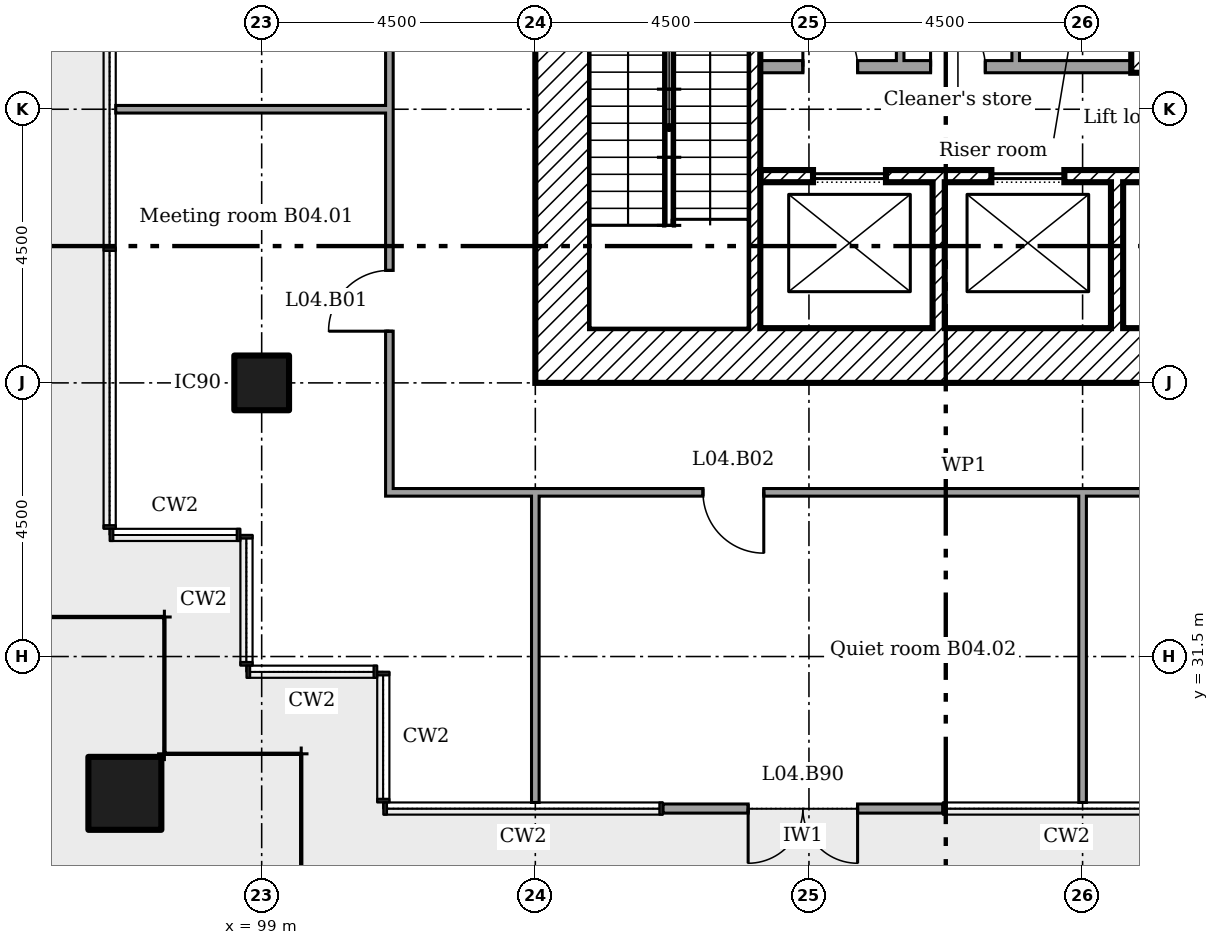
"""IFC4 building model, lengths in metres.
Left out: names, types, materials, properties, quantities, classifications, styles, units other than length and angle.
Written with IfcOpenShell. Run it as: python <this file> out.ifc"""

import sys

from ifc_helpers import new_model, si_unit, direction, frame, frame_2d, origin, origin_2d, place, context, subcontext, project, spatial, rectangle, extrude, element, fill, save


model = new_model("IFC4")
c1 = context("Model", 3, precision=1e-05, world=origin(), true_north=direction((0.0, 1.0)))
c2 = subcontext(c1, "Body", "Model", "MODEL_VIEW")
j1 = project(units=[si_unit("LENGTHUNIT", "METRE"), si_unit("PLANEANGLEUNIT", "RADIAN")], contexts=[c1])
p1 = place(None, origin())
s1 = spatial("IfcSite", under=j1, at=p1, CompositionType="ELEMENT")
p2 = place(p1, origin())
s2 = spatial("IfcBuilding", under=s1, at=p2, CompositionType="ELEMENT")
p3 = place(p2, frame((0.0, 0.0, 21.0)))
s3 = spatial("IfcBuildingStorey", under=s2, at=p3, CompositionType="ELEMENT", Elevation=21.0)
p4 = place(p3, frame((96.75, 29.25, 0.0)))
e1 = element("IfcColumn", 1, at=p4, inside=s3, PredefinedType="COLUMN", context=c2, shape_type="SweptSolid", body=[
    extrude(rectangle(XDim=1.2, YDim=1.2, at=origin_2d()), origin(), (0.0, 0.0, 1.0), 4.4),
])
p5 = place(p3, frame((99.0, 36.0, 0.0)))
e2 = element("IfcColumn", 2, at=p5, inside=s3, PredefinedType="COLUMN", context=c2, shape_type="SweptSolid", body=[
    extrude(rectangle(XDim=0.9, YDim=0.9, at=origin_2d()), origin(), (0.0, 0.0, 1.0), 4.4),
])
p6 = place(p3, frame((105.6, 29.0, 0.0)))
e3 = element("IfcWall", 3, at=p6, inside=s3, PredefinedType="SOLIDWALL", context=c2, shape_type="SweptSolid", body=[
    extrude(rectangle(XDim=4.6, YDim=0.15, at=frame_2d((2.3, 0.0))), origin(), (0.0, 0.0, 1.0), 4.225),
])
p7 = place(p6, frame((1.4, 0.0, 0.0)))
e4 = element("IfcOpeningElement", 4, at=p7, cuts=e3, PredefinedType="OPENING", context=c2, shape_type="SweptSolid", body=[
    extrude(rectangle(XDim=1.8, YDim=2.4, at=frame_2d((0.9, 1.2))), frame((0.0, 0.085, 0.0), z_axis=(0.0, -1.0, 0.0), x_axis=(1.0, 0.0, 0.0)), (0.0, 0.0, 1.0), 0.17),
])
p8 = place(p3, frame((104.4, 36.45, 0.0)))
e5 = element("IfcWall", 5, at=p8, inside=s3, PredefinedType="SHEAR", context=c2, shape_type="SweptSolid", body=[
    extrude(rectangle(XDim=11.7, YDim=0.9, at=frame_2d((5.85, 0.0))), origin(), (0.0, 0.0, 1.0), 4.125),
])
p9 = place(p3, frame((103.95, 36.0, 0.0), z_axis=(0.0, 0.0, 1.0), x_axis=(0.0, 1.0, 0.0)))
e6 = element("IfcWall", 6, at=p9, inside=s3, PredefinedType="SHEAR", context=c2, shape_type="SweptSolid", body=[
    extrude(rectangle(XDim=13.5, YDim=0.9, at=frame_2d((6.75, 0.0))), origin(), (0.0, 0.0, 1.0), 4.125),
])
p10 = place(p9, frame((8.2, 0.0, 0.0)))
e7 = element("IfcOpeningElement", 7, at=p10, cuts=e6, PredefinedType="OPENING", context=c2, shape_type="SweptSolid", body=[
    extrude(rectangle(XDim=1.2, YDim=2.1, at=frame_2d((0.6, 1.05))), frame((0.0, 0.46, 0.0), z_axis=(0.0, -1.0, 0.0), x_axis=(1.0, 0.0, 0.0)), (0.0, 0.0, 1.0), 0.92),
])
p11 = place(p9, frame((6.225, 0.0, 0.0)))
e8 = element("IfcOpeningElement", 8, at=p11, cuts=e6, PredefinedType="OPENING", context=c2, shape_type="SweptSolid", body=[
    extrude(rectangle(XDim=1.0, YDim=2.1, at=frame_2d((0.5, 1.05))), frame((0.0, 0.46, 0.0), z_axis=(0.0, -1.0, 0.0), x_axis=(1.0, 0.0, 0.0)), (0.0, 0.0, 1.0), 0.92),
])
for number, where, z_axis, x_axis in (
    (9, (110.133, 36.9, 0.0), (0.0, 0.0, 1.0), (0.0, 1.0, 0.0)),
    (10, (113.067, 36.9, 0.0), (0.0, 0.0, 1.0), (0.0, 1.0, 0.0)),
):
    element("IfcWall", number, at=place(p3, frame(where, z_axis=z_axis, x_axis=x_axis)), inside=s3, PredefinedType="SHEAR", context=c2, shape_type="SweptSolid", body=[
        extrude(rectangle(XDim=2.4, YDim=0.2, at=frame_2d((1.2, 0.0))), origin(), (0.0, 0.0, 1.0), 4.125),
    ])
p12 = place(p3, frame((107.2, 39.4, 0.0)))
e11 = element("IfcWall", 11, at=p12, inside=s3, PredefinedType="SHEAR", context=c2, shape_type="SweptSolid", body=[
    extrude(rectangle(XDim=8.9, YDim=0.2, at=frame_2d((4.45, 0.0))), origin(), (0.0, 0.0, 1.0), 4.125),
])
p13 = place(p12, frame((0.867, 0.0, 0.0)))
e12 = element("IfcOpeningElement", 12, at=p13, cuts=e11, PredefinedType="OPENING", context=c2, shape_type="SweptSolid", body=[
    extrude(rectangle(XDim=1.2, YDim=2.1, at=frame_2d((0.6, 1.05))), frame((0.0, 0.11, 0.0), z_axis=(0.0, -1.0, 0.0), x_axis=(1.0, 0.0, 0.0)), (0.0, 0.0, 1.0), 0.22),
])
p14 = place(p12, frame((3.8, 0.0, 0.0)))
e13 = element("IfcOpeningElement", 13, at=p14, cuts=e11, PredefinedType="OPENING", context=c2, shape_type="SweptSolid", body=[
    extrude(rectangle(XDim=1.2, YDim=2.1, at=frame_2d((0.6, 1.05))), frame((0.0, 0.11, 0.0), z_axis=(0.0, -1.0, 0.0), x_axis=(1.0, 0.0, 0.0)), (0.0, 0.0, 1.0), 0.22),
])
p15 = place(p12, frame((6.733, 0.0, 0.0)))
e14 = element("IfcOpeningElement", 14, at=p15, cuts=e11, PredefinedType="OPENING", context=c2, shape_type="SweptSolid", body=[
    extrude(rectangle(XDim=1.2, YDim=2.1, at=frame_2d((0.6, 1.05))), frame((0.0, 0.11, 0.0), z_axis=(0.0, -1.0, 0.0), x_axis=(1.0, 0.0, 0.0)), (0.0, 0.0, 1.0), 0.22),
])
p16 = place(p3, frame((107.1, 36.9, 0.0), z_axis=(0.0, 0.0, 1.0), x_axis=(0.0, 1.0, 0.0)))
e15 = element("IfcWall", 15, at=p16, inside=s3, PredefinedType="SHEAR", context=c2, shape_type="SweptSolid", body=[
    extrude(rectangle(XDim=6.8, YDim=0.2, at=frame_2d((3.4, 0.0))), origin(), (0.0, 0.0, 1.0), 4.125),
])
p17 = place(p3, frame((113.4, 41.1, 0.0), z_axis=(0.0, 0.0, 1.0), x_axis=(0.0, 1.0, 0.0)))
e16 = element("IfcWall", 16, at=p17, inside=s3, PredefinedType="SHEAR", context=c2, shape_type="SweptSolid", body=[
    extrude(rectangle(XDim=7.5, YDim=0.2, at=frame_2d((3.75, 0.0))), origin(), (0.0, 0.0, 1.0), 4.125),
])
p18 = place(p3, frame((107.2, 41.2, 0.0)))
e17 = element("IfcWall", 17, at=p18, inside=s3, PredefinedType="PARTITIONING", context=c2, shape_type="SweptSolid", body=[
    extrude(rectangle(XDim=6.1, YDim=0.2, at=frame_2d((3.05, 0.0))), origin(), (0.0, 0.0, 1.0), 4.125),
])
p19 = place(p18, frame((0.7, 0.0, 0.0)))
e18 = element("IfcOpeningElement", 18, at=p19, cuts=e17, PredefinedType="OPENING", context=c2, shape_type="SweptSolid", body=[
    extrude(rectangle(XDim=0.9, YDim=2.1, at=frame_2d((0.45, 1.05))), frame((0.0, 0.11, 0.0), z_axis=(0.0, -1.0, 0.0), x_axis=(1.0, 0.0, 0.0)), (0.0, 0.0, 1.0), 0.22),
])
p20 = place(p18, frame((2.8, 0.0, 0.0)))
e19 = element("IfcOpeningElement", 19, at=p20, cuts=e17, PredefinedType="OPENING", context=c2, shape_type="SweptSolid", body=[
    extrude(rectangle(XDim=0.9, YDim=2.1, at=frame_2d((0.45, 1.05))), frame((0.0, 0.11, 0.0), z_axis=(0.0, -1.0, 0.0), x_axis=(1.0, 0.0, 0.0)), (0.0, 0.0, 1.0), 0.22),
])
for number, where, z_axis, x_axis in (
    (20, (109.5, 41.3, 0.0), (0.0, 0.0, 1.0), (0.0, 1.0, 0.0)),
    (21, (111.4, 41.3, 0.0), (0.0, 0.0, 1.0), (0.0, 1.0, 0.0)),
):
    element("IfcWall", number, at=place(p3, frame(where, z_axis=z_axis, x_axis=x_axis)), inside=s3, PredefinedType="PARTITIONING", context=c2, shape_type="SweptSolid", body=[
        extrude(rectangle(XDim=1.7, YDim=0.125, at=frame_2d((0.85, 0.0))), origin(), (0.0, 0.0, 1.0), 4.125),
    ])
p21 = place(p3, frame((101.038, 34.2, 0.0)))
e22 = element("IfcWall", 22, at=p21, inside=s3, PredefinedType="PARTITIONING", context=c2, shape_type="SweptSolid", body=[
    extrude(rectangle(XDim=19.025, YDim=0.125, at=frame_2d((9.512, 0.0))), origin(), (0.0, 0.0, 1.0), 4.225),
])
p22 = place(p21, frame((5.219, 0.0, 0.0)))
e23 = element("IfcOpeningElement", 23, at=p22, cuts=e22, PredefinedType="OPENING", context=c2, shape_type="SweptSolid", body=[
    extrude(rectangle(XDim=1.0, YDim=2.1, at=frame_2d((0.5, 1.05))), frame((0.0, 0.073, 0.0), z_axis=(0.0, -1.0, 0.0), x_axis=(1.0, 0.0, 0.0)), (0.0, 0.0, 1.0), 0.145),
])
p23 = place(p3, frame((96.6, 40.5, 0.0)))
e24 = element("IfcWall", 24, at=p23, inside=s3, PredefinedType="PARTITIONING", context=c2, shape_type="SweptSolid", body=[
    extrude(rectangle(XDim=4.5, YDim=0.125, at=frame_2d((2.25, 0.0))), origin(), (0.0, 0.0, 1.0), 3.613),
])
p24 = place(p3, frame((101.1, 34.262, 0.0), z_axis=(0.0, 0.0, 1.0), x_axis=(0.0, 1.0, 0.0)))
e25 = element("IfcWall", 25, at=p24, inside=s3, PredefinedType="PARTITIONING", context=c2, shape_type="SweptSolid", body=[
    extrude(rectangle(XDim=17.575, YDim=0.125, at=frame_2d((8.788, 0.0))), origin(), (0.0, 0.0, 1.0), 4.225),
])
p25 = place(p24, frame((2.587, 0.0, 0.0)))
e26 = element("IfcOpeningElement", 26, at=p25, cuts=e25, PredefinedType="OPENING", context=c2, shape_type="SweptSolid", body=[
    extrude(rectangle(XDim=1.0, YDim=2.1, at=frame_2d((0.5, 1.05))), frame((0.0, 0.073, 0.0), z_axis=(0.0, -1.0, 0.0), x_axis=(1.0, 0.0, 0.0)), (0.0, 0.0, 1.0), 0.145),
])
p26 = place(p24, frame((13.101, 0.0, 0.0)))
e27 = element("IfcOpeningElement", 27, at=p26, cuts=e25, PredefinedType="OPENING", context=c2, shape_type="SweptSolid", body=[
    extrude(rectangle(XDim=1.0, YDim=2.1, at=frame_2d((0.5, 1.05))), frame((0.0, 0.073, 0.0), z_axis=(0.0, -1.0, 0.0), x_axis=(1.0, 0.0, 0.0)), (0.0, 0.0, 1.0), 0.145),
])
for number, where, z_axis, x_axis in (
    (28, (103.5, 29.1, 0.0), (0.0, 0.0, 1.0), (0.0, 1.0, 0.0)),
    (29, (112.5, 29.1, 0.0), (0.0, 0.0, 1.0), (0.0, 1.0, 0.0)),
):
    element("IfcWall", number, at=place(p3, frame(where, z_axis=z_axis, x_axis=x_axis)), inside=s3, PredefinedType="PARTITIONING", context=c2, shape_type="SweptSolid", body=[
        extrude(rectangle(XDim=5.1, YDim=0.125, at=frame_2d((2.55, 0.0))), origin(), (0.0, 0.0, 1.0), 3.613),
    ])
p27 = place(p7, frame((1.8, 0.0, 0.0), x_axis=(-1.0, 0.0, 0.0)))
e30 = element("IfcDoor", 30, at=p27, inside=s3, OperationType="DOUBLE_DOOR_DOUBLE_SWING", PredefinedType="NOTDEFINED", context=c2, shape_type="SweptSolid", body=[
    extrude(rectangle(XDim=1.8, YDim=2.4, at=frame_2d((0.9, 1.2))), frame((0.0, 0.025, 0.0), z_axis=(0.0, -1.0, 0.0), x_axis=(1.0, 0.0, 0.0)), (0.0, 0.0, 1.0), 0.05),
])
fill(e4, e30)
p28 = place(p19, origin())
e31 = element("IfcDoor", 31, at=p28, inside=s3, OperationType="SINGLE_SWING_RIGHT", PredefinedType="DOOR", context=c2, shape_type="SweptSolid", body=[
    extrude(rectangle(XDim=0.9, YDim=2.1, at=frame_2d((0.45, 1.05))), frame((0.0, 0.025, 0.0), z_axis=(0.0, -1.0, 0.0), x_axis=(1.0, 0.0, 0.0)), (0.0, 0.0, 1.0), 0.05),
])
fill(e18, e31)
p29 = place(p20, origin())
e32 = element("IfcDoor", 32, at=p29, inside=s3, OperationType="SINGLE_SWING_RIGHT", PredefinedType="DOOR", context=c2, shape_type="SweptSolid", body=[
    extrude(rectangle(XDim=0.9, YDim=2.1, at=frame_2d((0.45, 1.05))), frame((0.0, 0.025, 0.0), z_axis=(0.0, -1.0, 0.0), x_axis=(1.0, 0.0, 0.0)), (0.0, 0.0, 1.0), 0.05),
])
fill(e19, e32)
p30 = place(p13, origin())
e33 = element("IfcDoor", 33, at=p30, inside=s3, OperationType="SLIDING_TO_LEFT", PredefinedType="DOOR", context=c2, shape_type="SweptSolid", body=[
    extrude(rectangle(XDim=1.2, YDim=2.1, at=frame_2d((0.6, 1.05))), frame((0.0, 0.025, 0.0), z_axis=(0.0, -1.0, 0.0), x_axis=(1.0, 0.0, 0.0)), (0.0, 0.0, 1.0), 0.05),
])
fill(e12, e33)
p31 = place(p14, origin())
e34 = element("IfcDoor", 34, at=p31, inside=s3, OperationType="SLIDING_TO_LEFT", PredefinedType="DOOR", context=c2, shape_type="SweptSolid", body=[
    extrude(rectangle(XDim=1.2, YDim=2.1, at=frame_2d((0.6, 1.05))), frame((0.0, 0.025, 0.0), z_axis=(0.0, -1.0, 0.0), x_axis=(1.0, 0.0, 0.0)), (0.0, 0.0, 1.0), 0.05),
])
fill(e13, e34)
p32 = place(p25, origin())
e35 = element("IfcDoor", 35, at=p32, inside=s3, OperationType="SINGLE_SWING_RIGHT", PredefinedType="DOOR", context=c2, shape_type="SweptSolid", body=[
    extrude(rectangle(XDim=1.0, YDim=2.1, at=frame_2d((0.5, 1.05))), frame((0.0, 0.025, 0.0), z_axis=(0.0, -1.0, 0.0), x_axis=(1.0, 0.0, 0.0)), (0.0, 0.0, 1.0), 0.05),
])
fill(e26, e35)
p33 = place(p22, frame((1.0, 0.0, 0.0), x_axis=(-1.0, 0.0, 0.0)))
e36 = element("IfcDoor", 36, at=p33, inside=s3, OperationType="SINGLE_SWING_RIGHT", PredefinedType="DOOR", context=c2, shape_type="SweptSolid", body=[
    extrude(rectangle(XDim=1.0, YDim=2.1, at=frame_2d((0.5, 1.05))), frame((0.0, 0.025, 0.0), z_axis=(0.0, -1.0, 0.0), x_axis=(1.0, 0.0, 0.0)), (0.0, 0.0, 1.0), 0.05),
])
fill(e23, e36)
save(model, sys.argv[1])
